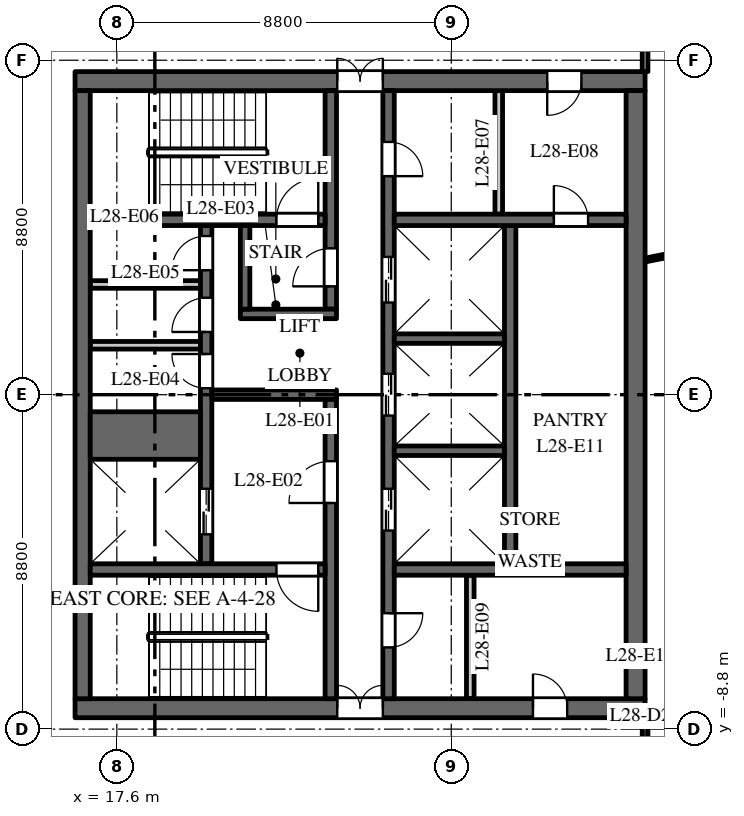
"""IFC4 building model, lengths in metres.
Left out: names, types, materials, properties, quantities, classifications, styles, units other than length and angle.
Written with IfcOpenShell. Run it as: python <this file> out.ifc"""

import sys

from ifc_helpers import new_model, si_unit, direction, frame, frame_2d, origin, place, context, subcontext, project, spatial, rectangle, extrude, element, fill, save


model = new_model("IFC4")
c1 = context("Model", 3, precision=1e-05, world=origin(), true_north=direction((0.0, 1.0)))
c2 = subcontext(c1, "Body", "Model", "MODEL_VIEW")
j1 = project(units=[si_unit("LENGTHUNIT", "METRE"), si_unit("PLANEANGLEUNIT", "RADIAN")], contexts=[c1])
p1 = place(None, origin())
s1 = spatial("IfcSite", under=j1, at=p1, CompositionType="ELEMENT")
p2 = place(p1, origin())
s2 = spatial("IfcBuilding", under=s1, at=p2, CompositionType="ELEMENT")
p3 = place(p2, frame((0.0, 0.0, 124.0)))
s3 = spatial("IfcBuildingStorey", under=s2, at=p3, CompositionType="ELEMENT", Elevation=124.0)
p4 = place(p3, frame((16.5, 8.25, 0.0), z_axis=(0.0, 0.0, 1.0), x_axis=(1.0, 0.0, 0.0)))
e1 = element("IfcWall", 1, at=p4, inside=s3, PredefinedType="SHEAR", context=c2, shape_type="SweptSolid", body=[
    extrude(rectangle(XDim=15.0, YDim=0.5, at=frame_2d((7.5, 0.0))), origin(), (0.0, 0.0, 1.0), 3.7),
])
p5 = place(p4, frame((6.9, 0.0, 0.0)))
e2 = element("IfcOpeningElement", 2, at=p5, cuts=e1, PredefinedType="OPENING", context=c2, shape_type="SweptSolid", body=[
    extrude(rectangle(XDim=1.2, YDim=2.1, at=frame_2d((0.6, 1.05))), frame((0.0, 0.26, 0.0), z_axis=(0.0, -1.0, 0.0), x_axis=(1.0, 0.0, 0.0)), (0.0, 0.0, 1.0), 0.52),
])
p6 = place(p4, frame((12.425, 0.0, 0.0)))
e3 = element("IfcOpeningElement", 3, at=p6, cuts=e1, PredefinedType="OPENING", context=c2, shape_type="SweptSolid", body=[
    extrude(rectangle(XDim=0.9, YDim=2.1, at=frame_2d((0.45, 1.05))), frame((0.0, 0.26, 0.0), z_axis=(0.0, -1.0, 0.0), x_axis=(1.0, 0.0, 0.0)), (0.0, 0.0, 1.0), 0.52),
])
p7 = place(p3, frame((16.5, -8.25, 0.0), z_axis=(0.0, 0.0, 1.0), x_axis=(1.0, 0.0, 0.0)))
e4 = element("IfcWall", 4, at=p7, inside=s3, PredefinedType="SHEAR", context=c2, shape_type="SweptSolid", body=[
    extrude(rectangle(XDim=15.0, YDim=0.5, at=frame_2d((7.5, 0.0))), origin(), (0.0, 0.0, 1.0), 3.7),
])
p8 = place(p7, frame((6.9, 0.0, 0.0)))
e5 = element("IfcOpeningElement", 5, at=p8, cuts=e4, PredefinedType="OPENING", context=c2, shape_type="SweptSolid", body=[
    extrude(rectangle(XDim=1.2, YDim=2.1, at=frame_2d((0.6, 1.05))), frame((0.0, 0.26, 0.0), z_axis=(0.0, -1.0, 0.0), x_axis=(1.0, 0.0, 0.0)), (0.0, 0.0, 1.0), 0.52),
])
p9 = place(p7, frame((12.05, 0.0, 0.0)))
e6 = element("IfcOpeningElement", 6, at=p9, cuts=e4, PredefinedType="OPENING", context=c2, shape_type="SweptSolid", body=[
    extrude(rectangle(XDim=0.9, YDim=2.1, at=frame_2d((0.45, 1.05))), frame((0.0, 0.26, 0.0), z_axis=(0.0, -1.0, 0.0), x_axis=(1.0, 0.0, 0.0)), (0.0, 0.0, 1.0), 0.52),
])
for number, where, z_axis, x_axis in (
    (7, (16.9, 1.3, 0.0), (0.0, 0.0, 1.0), (1.0, 0.0, 0.0)),
    (8, (16.9, 2.9, 0.0), (0.0, 0.0, 1.0), (1.0, 0.0, 0.0)),
):
    element("IfcWall", number, at=place(p3, frame(where, z_axis=z_axis, x_axis=x_axis)), inside=s3, PredefinedType="PARTITIONING", context=c2, shape_type="SweptSolid", body=[
        extrude(rectangle(XDim=2.9, YDim=0.2, at=frame_2d((1.45, 0.0))), origin(), (0.0, 0.0, 1.0), 3.7),
    ])
p10 = place(p3, frame((27.95, -4.45, 0.0), z_axis=(0.0, 0.0, 1.0), x_axis=(0.0, 1.0, 0.0)))
e9 = element("IfcWall", 9, at=p10, inside=s3, PredefinedType="SHEAR", context=c2, shape_type="SweptSolid", body=[
    extrude(rectangle(XDim=8.9, YDim=0.3, at=frame_2d((4.45, 0.0))), origin(), (0.0, 0.0, 1.0), 3.7),
])
p11 = place(p3, frame((19.95, -4.45, 0.0), z_axis=(0.0, 0.0, 1.0), x_axis=(0.0, 1.0, 0.0)))
e10 = element("IfcWall", 10, at=p11, inside=s3, PredefinedType="SHEAR", context=c2, shape_type="SweptSolid", body=[
    extrude(rectangle(XDim=8.9, YDim=0.3, at=frame_2d((4.45, 0.0))), origin(), (0.0, 0.0, 1.0), 3.7),
])
p12 = place(p11, frame((0.775, 0.0, 0.0)))
e11 = element("IfcOpeningElement", 11, at=p12, cuts=e10, PredefinedType="OPENING", context=c2, shape_type="SweptSolid", body=[
    extrude(rectangle(XDim=1.2, YDim=2.1, at=frame_2d((0.6, 1.05))), frame((0.0, 0.16, 0.0), z_axis=(0.0, -1.0, 0.0), x_axis=(1.0, 0.0, 0.0)), (0.0, 0.0, 1.0), 0.32),
])
p13 = place(p11, frame((4.62, 0.0, 0.0)))
e12 = element("IfcOpeningElement", 12, at=p13, cuts=e10, PredefinedType="OPENING", context=c2, shape_type="SweptSolid", body=[
    extrude(rectangle(XDim=0.9, YDim=2.1, at=frame_2d((0.45, 1.05))), frame((0.0, 0.16, 0.0), z_axis=(0.0, -1.0, 0.0), x_axis=(1.0, 0.0, 0.0)), (0.0, 0.0, 1.0), 0.32),
])
p14 = place(p11, frame((6.1, 0.0, 0.0)))
e13 = element("IfcOpeningElement", 13, at=p14, cuts=e10, PredefinedType="OPENING", context=c2, shape_type="SweptSolid", body=[
    extrude(rectangle(XDim=0.9, YDim=2.1, at=frame_2d((0.45, 1.05))), frame((0.0, 0.16, 0.0), z_axis=(0.0, -1.0, 0.0), x_axis=(1.0, 0.0, 0.0)), (0.0, 0.0, 1.0), 0.32),
])
p15 = place(p11, frame((7.725, 0.0, 0.0)))
e14 = element("IfcOpeningElement", 14, at=p15, cuts=e10, PredefinedType="OPENING", context=c2, shape_type="SweptSolid", body=[
    extrude(rectangle(XDim=0.9, YDim=2.1, at=frame_2d((0.45, 1.05))), frame((0.0, 0.16, 0.0), z_axis=(0.0, -1.0, 0.0), x_axis=(1.0, 0.0, 0.0)), (0.0, 0.0, 1.0), 0.32),
])
p16 = place(p3, frame((24.75, -8.0, 0.0), z_axis=(0.0, 0.0, 1.0), x_axis=(0.0, 1.0, 0.0)))
e15 = element("IfcWall", 15, at=p16, inside=s3, PredefinedType="SHEAR", context=c2, shape_type="SweptSolid", body=[
    extrude(rectangle(XDim=16.0, YDim=0.3, at=frame_2d((8.0, 0.0))), origin(), (0.0, 0.0, 1.0), 3.7),
])
p17 = place(p16, frame((4.425, 0.0, 0.0)))
e16 = element("IfcOpeningElement", 16, at=p17, cuts=e15, PredefinedType="OPENING", context=c2, shape_type="SweptSolid", body=[
    extrude(rectangle(XDim=1.1, YDim=2.1, at=frame_2d((0.55, 1.05))), frame((0.0, 0.16, 0.0), z_axis=(0.0, -1.0, 0.0), x_axis=(1.0, 0.0, 0.0)), (0.0, 0.0, 1.0), 0.32),
])
p18 = place(p16, frame((7.45, 0.0, 0.0)))
e17 = element("IfcOpeningElement", 17, at=p18, cuts=e15, PredefinedType="OPENING", context=c2, shape_type="SweptSolid", body=[
    extrude(rectangle(XDim=1.1, YDim=2.1, at=frame_2d((0.55, 1.05))), frame((0.0, 0.16, 0.0), z_axis=(0.0, -1.0, 0.0), x_axis=(1.0, 0.0, 0.0)), (0.0, 0.0, 1.0), 0.32),
])
p19 = place(p16, frame((10.425, 0.0, 0.0)))
e18 = element("IfcOpeningElement", 18, at=p19, cuts=e15, PredefinedType="OPENING", context=c2, shape_type="SweptSolid", body=[
    extrude(rectangle(XDim=1.2, YDim=2.1, at=frame_2d((0.6, 1.05))), frame((0.0, 0.16, 0.0), z_axis=(0.0, -1.0, 0.0), x_axis=(1.0, 0.0, 0.0)), (0.0, 0.0, 1.0), 0.32),
])
p20 = place(p16, frame((13.75, 0.0, 0.0)))
e19 = element("IfcOpeningElement", 19, at=p20, cuts=e15, PredefinedType="OPENING", context=c2, shape_type="SweptSolid", body=[
    extrude(rectangle(XDim=0.9, YDim=2.1, at=frame_2d((0.45, 1.05))), frame((0.0, 0.16, 0.0), z_axis=(0.0, -1.0, 0.0), x_axis=(1.0, 0.0, 0.0)), (0.0, 0.0, 1.0), 0.32),
])
p21 = place(p16, frame((1.35, 0.0, 0.0)))
e20 = element("IfcOpeningElement", 20, at=p21, cuts=e15, PredefinedType="OPENING", context=c2, shape_type="SweptSolid", body=[
    extrude(rectangle(XDim=0.9, YDim=2.1, at=frame_2d((0.45, 1.05))), frame((0.0, 0.16, 0.0), z_axis=(0.0, -1.0, 0.0), x_axis=(1.0, 0.0, 0.0)), (0.0, 0.0, 1.0), 0.32),
])
p22 = place(p3, frame((20.1, 0.0, 0.0), z_axis=(0.0, 0.0, 1.0), x_axis=(1.0, 0.0, 0.0)))
e21 = element("IfcWall", 21, at=p22, inside=s3, PredefinedType="SHEAR", context=c2, shape_type="SweptSolid", body=[
    extrude(rectangle(XDim=3.28, YDim=0.25, at=frame_2d((1.64, 0.0))), origin(), (0.0, 0.0, 1.0), 3.7),
])
p23 = place(p3, frame((16.7, -8.0, 0.0), z_axis=(0.0, 0.0, 1.0), x_axis=(0.0, 1.0, 0.0)))
e22 = element("IfcWall", 22, at=p23, inside=s3, PredefinedType="SHEAR", context=c2, shape_type="SweptSolid", body=[
    extrude(rectangle(XDim=16.0, YDim=0.4, at=frame_2d((8.0, 0.0))), origin(), (0.0, 0.0, 1.0), 3.7),
])
p24 = place(p3, frame((31.25, -8.0, 0.0), z_axis=(0.0, 0.0, 1.0), x_axis=(0.0, 1.0, 0.0)))
e23 = element("IfcWall", 23, at=p24, inside=s3, PredefinedType="SHEAR", context=c2, shape_type="SweptSolid", body=[
    extrude(rectangle(XDim=16.0, YDim=0.5, at=frame_2d((8.0, 0.0))), origin(), (0.0, 0.0, 1.0), 3.7),
])
p25 = place(p3, frame((24.9, 4.6, 0.0), z_axis=(0.0, 0.0, 1.0), x_axis=(1.0, 0.0, 0.0)))
e24 = element("IfcWall", 24, at=p25, inside=s3, PredefinedType="SHEAR", context=c2, shape_type="SweptSolid", body=[
    extrude(rectangle(XDim=6.1, YDim=0.3, at=frame_2d((3.05, 0.0))), origin(), (0.0, 0.0, 1.0), 3.7),
])
p26 = place(p25, frame((4.2, 0.0, 0.0)))
e25 = element("IfcOpeningElement", 25, at=p26, cuts=e24, PredefinedType="OPENING", context=c2, shape_type="SweptSolid", body=[
    extrude(rectangle(XDim=0.9, YDim=2.1, at=frame_2d((0.45, 1.05))), frame((0.0, 0.16, 0.0), z_axis=(0.0, -1.0, 0.0), x_axis=(1.0, 0.0, 0.0)), (0.0, 0.0, 1.0), 0.32),
])
for number, where, z_axis, x_axis in (
    (26, (27.65, 4.75, 0.0), (0.0, 0.0, 1.0), (0.0, 1.0, 0.0)),
    (27, (26.9, -8.0, 0.0), (0.0, 0.0, 1.0), (0.0, 1.0, 0.0)),
):
    element("IfcWall", number, at=place(p3, frame(where, z_axis=z_axis, x_axis=x_axis)), inside=s3, PredefinedType="PARTITIONING", context=c2, shape_type="SweptSolid", body=[
        extrude(rectangle(XDim=3.25, YDim=0.2, at=frame_2d((1.625, 0.0))), origin(), (0.0, 0.0, 1.0), 3.7),
    ])
p27 = place(p3, frame((24.9, -4.6, 0.0), z_axis=(0.0, 0.0, 1.0), x_axis=(1.0, 0.0, 0.0)))
e28 = element("IfcWall", 28, at=p27, inside=s3, PredefinedType="SHEAR", context=c2, shape_type="SweptSolid", body=[
    extrude(rectangle(XDim=6.1, YDim=0.3, at=frame_2d((3.05, 0.0))), origin(), (0.0, 0.0, 1.0), 3.7),
])
p28 = place(p3, frame((16.9, -1.075, 0.0), z_axis=(0.0, 0.0, 1.0), x_axis=(1.0, 0.0, 0.0)))
e29 = element("IfcWall", 29, at=p28, inside=s3, PredefinedType="SHEAR", context=c2, shape_type="SweptSolid", body=[
    extrude(rectangle(XDim=2.9, YDim=1.25, at=frame_2d((1.45, 0.0))), origin(), (0.0, 0.0, 1.0), 3.7),
])
for number, where, z_axis, x_axis in (
    (30, (24.9, -1.475, 0.0), (0.0, 0.0, 1.0), (1.0, 0.0, 0.0)),
    (31, (24.9, 1.475, 0.0), (0.0, 0.0, 1.0), (1.0, 0.0, 0.0)),
):
    element("IfcWall", number, at=place(p3, frame(where, z_axis=z_axis, x_axis=x_axis)), inside=s3, PredefinedType="SHEAR", context=c2, shape_type="SweptSolid", body=[
        extrude(rectangle(XDim=2.9, YDim=0.25, at=frame_2d((1.45, 0.0))), origin(), (0.0, 0.0, 1.0), 3.7),
    ])
p29 = place(p3, frame((23.23, 2.25, 0.0), z_axis=(0.0, 0.0, 1.0), x_axis=(0.0, 1.0, 0.0)))
e32 = element("IfcWall", 32, at=p29, inside=s3, PredefinedType="SHEAR", context=c2, shape_type="SweptSolid", body=[
    extrude(rectangle(XDim=5.75, YDim=0.3, at=frame_2d((2.875, 0.0))), origin(), (0.0, 0.0, 1.0), 3.7),
])
p30 = place(p29, frame((0.6, 0.0, 0.0)))
e33 = element("IfcOpeningElement", 33, at=p30, cuts=e32, PredefinedType="OPENING", context=c2, shape_type="SweptSolid", body=[
    extrude(rectangle(XDim=1.0, YDim=2.1, at=frame_2d((0.5, 1.05))), frame((0.0, 0.16, 0.0), z_axis=(0.0, -1.0, 0.0), x_axis=(1.0, 0.0, 0.0)), (0.0, 0.0, 1.0), 0.32),
])
p31 = place(p3, frame((23.23, -8.0, 0.0), z_axis=(0.0, 0.0, 1.0), x_axis=(0.0, 1.0, 0.0)))
e34 = element("IfcWall", 34, at=p31, inside=s3, PredefinedType="SHEAR", context=c2, shape_type="SweptSolid", body=[
    extrude(rectangle(XDim=7.875, YDim=0.3, at=frame_2d((3.938, 0.0))), origin(), (0.0, 0.0, 1.0), 3.7),
])
p32 = place(p31, frame((5.15, 0.0, 0.0)))
e35 = element("IfcOpeningElement", 35, at=p32, cuts=e34, PredefinedType="OPENING", context=c2, shape_type="SweptSolid", body=[
    extrude(rectangle(XDim=1.1, YDim=2.1, at=frame_2d((0.55, 1.05))), frame((0.0, 0.16, 0.0), z_axis=(0.0, -1.0, 0.0), x_axis=(1.0, 0.0, 0.0)), (0.0, 0.0, 1.0), 0.32),
])
p33 = place(p3, frame((16.9, 4.6, 0.0), z_axis=(0.0, 0.0, 1.0), x_axis=(1.0, 0.0, 0.0)))
e36 = element("IfcWall", 36, at=p33, inside=s3, PredefinedType="SHEAR", context=c2, shape_type="SweptSolid", body=[
    extrude(rectangle(XDim=6.18, YDim=0.3, at=frame_2d((3.09, 0.0))), origin(), (0.0, 0.0, 1.0), 3.7),
])
p34 = place(p33, frame((4.9, 0.0, 0.0)))
e37 = element("IfcOpeningElement", 37, at=p34, cuts=e36, PredefinedType="OPENING", context=c2, shape_type="SweptSolid", body=[
    extrude(rectangle(XDim=1.1, YDim=2.1, at=frame_2d((0.55, 1.05))), frame((0.0, 0.16, 0.0), z_axis=(0.0, -1.0, 0.0), x_axis=(1.0, 0.0, 0.0)), (0.0, 0.0, 1.0), 0.32),
])
p35 = place(p3, frame((16.9, -4.6, 0.0), z_axis=(0.0, 0.0, 1.0), x_axis=(1.0, 0.0, 0.0)))
e38 = element("IfcWall", 38, at=p35, inside=s3, PredefinedType="SHEAR", context=c2, shape_type="SweptSolid", body=[
    extrude(rectangle(XDim=6.18, YDim=0.3, at=frame_2d((3.09, 0.0))), origin(), (0.0, 0.0, 1.0), 3.7),
])
p36 = place(p35, frame((4.9, 0.0, 0.0)))
e39 = element("IfcOpeningElement", 39, at=p36, cuts=e38, PredefinedType="OPENING", context=c2, shape_type="SweptSolid", body=[
    extrude(rectangle(XDim=1.1, YDim=2.1, at=frame_2d((0.55, 1.05))), frame((0.0, 0.16, 0.0), z_axis=(0.0, -1.0, 0.0), x_axis=(1.0, 0.0, 0.0)), (0.0, 0.0, 1.0), 0.32),
])
p37 = place(p3, frame((20.85, 2.125, 0.0), z_axis=(0.0, 0.0, 1.0), x_axis=(1.0, 0.0, 0.0)))
e40 = element("IfcWall", 40, at=p37, inside=s3, PredefinedType="SHEAR", context=c2, shape_type="SweptSolid", body=[
    extrude(rectangle(XDim=2.53, YDim=0.25, at=frame_2d((1.265, 0.0))), origin(), (0.0, 0.0, 1.0), 3.7),
])
p38 = place(p3, frame((20.975, 2.25, 0.0), z_axis=(0.0, 0.0, 1.0), x_axis=(0.0, 1.0, 0.0)))
e41 = element("IfcWall", 41, at=p38, inside=s3, PredefinedType="SHEAR", context=c2, shape_type="SweptSolid", body=[
    extrude(rectangle(XDim=2.2, YDim=0.25, at=frame_2d((1.1, 0.0))), origin(), (0.0, 0.0, 1.0), 3.7),
])
p39 = place(p3, frame((31.5, -10.7, 0.0), z_axis=(0.0, 0.0, 1.0), x_axis=(0.0, 1.0, 0.0)))
e42 = element("IfcWall", 42, at=p39, inside=s3, PredefinedType="PARTITIONING", context=c2, shape_type="SweptSolid", body=[
    extrude(rectangle(XDim=2.2, YDim=0.15, at=frame_2d((1.1, 0.0))), origin(), (0.0, 0.0, 1.0), 2.9),
])
p40 = place(p39, frame((0.65, 0.0, 0.0)))
e43 = element("IfcOpeningElement", 43, at=p40, cuts=e42, PredefinedType="OPENING", context=c2, shape_type="SweptSolid", body=[
    extrude(rectangle(XDim=1.0, YDim=2.1, at=frame_2d((0.5, 1.05))), frame((0.0, 0.085, 0.0), z_axis=(0.0, -1.0, 0.0), x_axis=(1.0, 0.0, 0.0)), (0.0, 0.0, 1.0), 0.17),
])
p41 = place(p3, frame((31.5, 3.542, 0.0), z_axis=(0.0, 0.0, 1.0), x_axis=(0.980357474535, 0.197228857227, 0.0)))
e44 = element("IfcWall", 44, at=p41, inside=s3, PredefinedType="PARTITIONING", context=c2, shape_type="SweptSolid", body=[
    extrude(rectangle(XDim=4.092, YDim=0.1, at=frame_2d((2.046, 0.0))), origin(), (0.0, 0.0, 1.0), 2.9),
])
p42 = place(p3, frame((31.5, 8.5, 0.0), z_axis=(0.0, 0.0, 1.0), x_axis=(0.0, 1.0, 0.0)))
e45 = element("IfcWall", 45, at=p42, inside=s3, PredefinedType="PARTITIONING", context=c2, shape_type="SweptSolid", body=[
    extrude(rectangle(XDim=2.2, YDim=0.15, at=frame_2d((1.1, 0.0))), origin(), (0.0, 0.0, 1.0), 2.9),
])
p43 = place(p12, origin())
e46 = element("IfcDoor", 46, at=p43, inside=s3, OperationType="DOUBLE_DOOR_SLIDING", PredefinedType="DOOR", context=c2, shape_type="SweptSolid", body=[
    extrude(rectangle(XDim=1.2, YDim=2.1, at=frame_2d((0.6, 1.05))), frame((0.0, 0.025, 0.0), z_axis=(0.0, -1.0, 0.0), x_axis=(1.0, 0.0, 0.0)), (0.0, 0.0, 1.0), 0.05),
])
fill(e11, e46)
p44 = place(p17, origin())
e47 = element("IfcDoor", 47, at=p44, inside=s3, OperationType="DOUBLE_DOOR_SLIDING", PredefinedType="DOOR", context=c2, shape_type="SweptSolid", body=[
    extrude(rectangle(XDim=1.1, YDim=2.1, at=frame_2d((0.55, 1.05))), frame((0.0, 0.025, 0.0), z_axis=(0.0, -1.0, 0.0), x_axis=(1.0, 0.0, 0.0)), (0.0, 0.0, 1.0), 0.05),
])
fill(e16, e47)
p45 = place(p18, origin())
e48 = element("IfcDoor", 48, at=p45, inside=s3, OperationType="DOUBLE_DOOR_SLIDING", PredefinedType="DOOR", context=c2, shape_type="SweptSolid", body=[
    extrude(rectangle(XDim=1.1, YDim=2.1, at=frame_2d((0.55, 1.05))), frame((0.0, 0.025, 0.0), z_axis=(0.0, -1.0, 0.0), x_axis=(1.0, 0.0, 0.0)), (0.0, 0.0, 1.0), 0.05),
])
fill(e17, e48)
p46 = place(p19, origin())
e49 = element("IfcDoor", 49, at=p46, inside=s3, OperationType="DOUBLE_DOOR_SLIDING", PredefinedType="DOOR", context=c2, shape_type="SweptSolid", body=[
    extrude(rectangle(XDim=1.2, YDim=2.1, at=frame_2d((0.6, 1.05))), frame((0.0, 0.025, 0.0), z_axis=(0.0, -1.0, 0.0), x_axis=(1.0, 0.0, 0.0)), (0.0, 0.0, 1.0), 0.05),
])
fill(e18, e49)
p47 = place(p34, origin())
e50 = element("IfcDoor", 50, at=p47, inside=s3, OperationType="SINGLE_SWING_LEFT", PredefinedType="DOOR", context=c2, shape_type="SweptSolid", body=[
    extrude(rectangle(XDim=1.1, YDim=2.1, at=frame_2d((0.55, 1.05))), frame((0.0, 0.025, 0.0), z_axis=(0.0, -1.0, 0.0), x_axis=(1.0, 0.0, 0.0)), (0.0, 0.0, 1.0), 0.05),
])
fill(e37, e50)
p48 = place(p36, origin())
e51 = element("IfcDoor", 51, at=p48, inside=s3, OperationType="SINGLE_SWING_RIGHT", PredefinedType="DOOR", context=c2, shape_type="SweptSolid", body=[
    extrude(rectangle(XDim=1.1, YDim=2.1, at=frame_2d((0.55, 1.05))), frame((0.0, 0.025, 0.0), z_axis=(0.0, -1.0, 0.0), x_axis=(1.0, 0.0, 0.0)), (0.0, 0.0, 1.0), 0.05),
])
fill(e39, e51)
p49 = place(p32, origin())
e52 = element("IfcDoor", 52, at=p49, inside=s3, OperationType="SINGLE_SWING_RIGHT", PredefinedType="DOOR", context=c2, shape_type="SweptSolid", body=[
    extrude(rectangle(XDim=1.1, YDim=2.1, at=frame_2d((0.55, 1.05))), frame((0.0, 0.025, 0.0), z_axis=(0.0, -1.0, 0.0), x_axis=(1.0, 0.0, 0.0)), (0.0, 0.0, 1.0), 0.05),
])
fill(e35, e52)
p50 = place(p30, origin())
e53 = element("IfcDoor", 53, at=p50, inside=s3, OperationType="SINGLE_SWING_RIGHT", PredefinedType="DOOR", context=c2, shape_type="SweptSolid", body=[
    extrude(rectangle(XDim=1.0, YDim=2.1, at=frame_2d((0.5, 1.05))), frame((0.0, 0.025, 0.0), z_axis=(0.0, -1.0, 0.0), x_axis=(1.0, 0.0, 0.0)), (0.0, 0.0, 1.0), 0.05),
])
fill(e33, e53)
p51 = place(p5, origin())
e54 = element("IfcDoor", 54, at=p51, inside=s3, OperationType="DOUBLE_DOOR_DOUBLE_SWING", PredefinedType="DOOR", context=c2, shape_type="SweptSolid", body=[
    extrude(rectangle(XDim=1.2, YDim=2.1, at=frame_2d((0.6, 1.05))), frame((0.0, 0.025, 0.0), z_axis=(0.0, -1.0, 0.0), x_axis=(1.0, 0.0, 0.0)), (0.0, 0.0, 1.0), 0.05),
])
fill(e2, e54)
p52 = place(p8, origin())
e55 = element("IfcDoor", 55, at=p52, inside=s3, OperationType="DOUBLE_DOOR_DOUBLE_SWING", PredefinedType="DOOR", context=c2, shape_type="SweptSolid", body=[
    extrude(rectangle(XDim=1.2, YDim=2.1, at=frame_2d((0.6, 1.05))), frame((0.0, 0.025, 0.0), z_axis=(0.0, -1.0, 0.0), x_axis=(1.0, 0.0, 0.0)), (0.0, 0.0, 1.0), 0.05),
])
fill(e5, e55)
p53 = place(p13, origin())
e56 = element("IfcDoor", 56, at=p53, inside=s3, OperationType="SINGLE_SWING_LEFT", PredefinedType="DOOR", context=c2, shape_type="SweptSolid", body=[
    extrude(rectangle(XDim=0.9, YDim=2.1, at=frame_2d((0.45, 1.05))), frame((0.0, 0.025, 0.0), z_axis=(0.0, -1.0, 0.0), x_axis=(1.0, 0.0, 0.0)), (0.0, 0.0, 1.0), 0.05),
])
fill(e12, e56)
p54 = place(p14, origin())
e57 = element("IfcDoor", 57, at=p54, inside=s3, OperationType="SINGLE_SWING_RIGHT", PredefinedType="DOOR", context=c2, shape_type="SweptSolid", body=[
    extrude(rectangle(XDim=0.9, YDim=2.1, at=frame_2d((0.45, 1.05))), frame((0.0, 0.025, 0.0), z_axis=(0.0, -1.0, 0.0), x_axis=(1.0, 0.0, 0.0)), (0.0, 0.0, 1.0), 0.05),
])
fill(e13, e57)
p55 = place(p15, origin())
e58 = element("IfcDoor", 58, at=p55, inside=s3, OperationType="SINGLE_SWING_RIGHT", PredefinedType="DOOR", context=c2, shape_type="SweptSolid", body=[
    extrude(rectangle(XDim=0.9, YDim=2.1, at=frame_2d((0.45, 1.05))), frame((0.0, 0.025, 0.0), z_axis=(0.0, -1.0, 0.0), x_axis=(1.0, 0.0, 0.0)), (0.0, 0.0, 1.0), 0.05),
])
fill(e14, e58)
p56 = place(p20, origin())
e59 = element("IfcDoor", 59, at=p56, inside=s3, OperationType="SINGLE_SWING_LEFT", PredefinedType="DOOR", context=c2, shape_type="SweptSolid", body=[
    extrude(rectangle(XDim=0.9, YDim=2.1, at=frame_2d((0.45, 1.05))), frame((0.0, 0.025, 0.0), z_axis=(0.0, -1.0, 0.0), x_axis=(1.0, 0.0, 0.0)), (0.0, 0.0, 1.0), 0.05),
])
fill(e19, e59)
p57 = place(p6, origin())
e60 = element("IfcDoor", 60, at=p57, inside=s3, OperationType="SINGLE_SWING_LEFT", PredefinedType="DOOR", context=c2, shape_type="SweptSolid", body=[
    extrude(rectangle(XDim=0.9, YDim=2.1, at=frame_2d((0.45, 1.05))), frame((0.0, 0.025, 0.0), z_axis=(0.0, -1.0, 0.0), x_axis=(1.0, 0.0, 0.0)), (0.0, 0.0, 1.0), 0.05),
])
fill(e3, e60)
p58 = place(p21, origin())
e61 = element("IfcDoor", 61, at=p58, inside=s3, OperationType="SINGLE_SWING_RIGHT", PredefinedType="DOOR", context=c2, shape_type="SweptSolid", body=[
    extrude(rectangle(XDim=0.9, YDim=2.1, at=frame_2d((0.45, 1.05))), frame((0.0, 0.025, 0.0), z_axis=(0.0, -1.0, 0.0), x_axis=(1.0, 0.0, 0.0)), (0.0, 0.0, 1.0), 0.05),
])
fill(e20, e61)
p59 = place(p9, origin())
e62 = element("IfcDoor", 62, at=p59, inside=s3, OperationType="SINGLE_SWING_RIGHT", PredefinedType="DOOR", context=c2, shape_type="SweptSolid", body=[
    extrude(rectangle(XDim=0.9, YDim=2.1, at=frame_2d((0.45, 1.05))), frame((0.0, 0.025, 0.0), z_axis=(0.0, -1.0, 0.0), x_axis=(1.0, 0.0, 0.0)), (0.0, 0.0, 1.0), 0.05),
])
fill(e6, e62)
p60 = place(p26, origin())
e63 = element("IfcDoor", 63, at=p60, inside=s3, OperationType="SINGLE_SWING_RIGHT", PredefinedType="DOOR", context=c2, shape_type="SweptSolid", body=[
    extrude(rectangle(XDim=0.9, YDim=2.1, at=frame_2d((0.45, 1.05))), frame((0.0, 0.025, 0.0), z_axis=(0.0, -1.0, 0.0), x_axis=(1.0, 0.0, 0.0)), (0.0, 0.0, 1.0), 0.05),
])
fill(e25, e63)
save(model, sys.argv[1])
